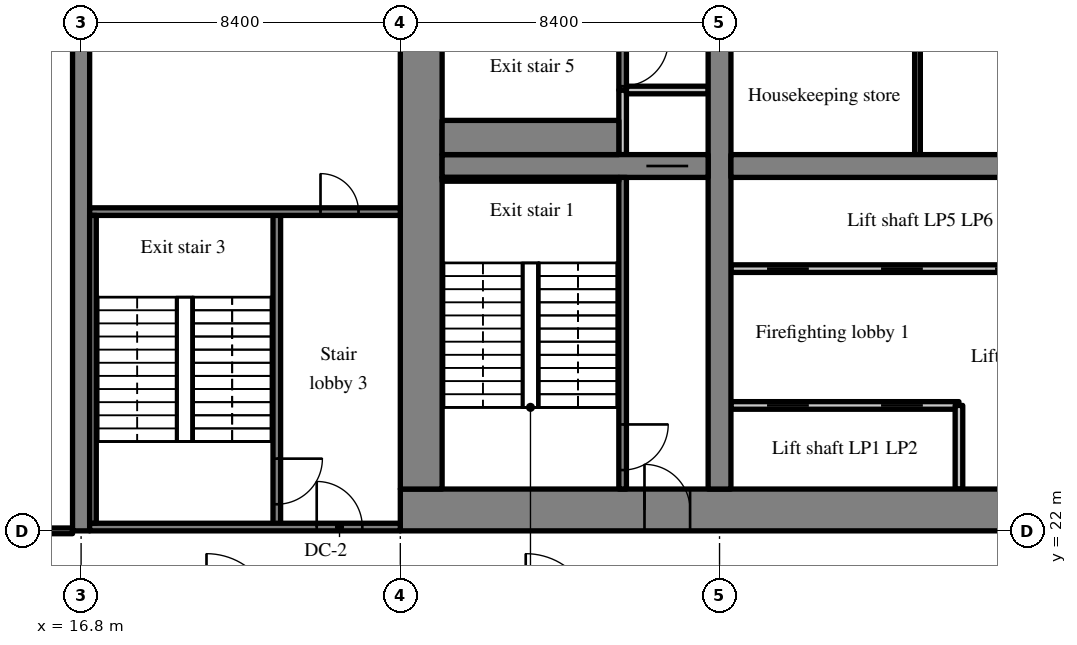
"""IFC4 building model, lengths in metres.
Left out: names, types, materials, properties, quantities, classifications, styles, units other than length and angle.
Written with IfcOpenShell. Run it as: python <this file> out.ifc"""

import sys

from ifc_helpers import new_model, si_unit, direction, frame, frame_2d, origin, place, context, subcontext, project, spatial, rectangle, extrude, source, transform, mapped, element, fill, save


model = new_model("IFC4")
c1 = context("Model", 3, precision=1e-05, world=origin(), true_north=direction((0.0, 1.0)))
c2 = subcontext(c1, "Body", "Model", "MODEL_VIEW")
j1 = project(units=[si_unit("LENGTHUNIT", "METRE"), si_unit("PLANEANGLEUNIT", "RADIAN")], contexts=[c1])
p1 = place(None, origin())
s1 = spatial("IfcSite", under=j1, at=p1, CompositionType="ELEMENT")
p2 = place(p1, origin())
s2 = spatial("IfcBuilding", under=s1, at=p2, CompositionType="ELEMENT")
p3 = place(p2, frame((0.0, 0.0, 18.0)))
s3 = spatial("IfcBuildingStorey", under=s2, at=p3, CompositionType="ELEMENT", Elevation=18.0)
m1 = source(origin(), c2, "Body", "SweptSolid", [
    extrude(rectangle(XDim=50.4, YDim=1.1, at=frame_2d((25.2, 0.0))), origin(), (0.0, 0.0, 1.0), 4.72),
])
p4 = place(p3, frame((25.2, 22.55, 0.0), z_axis=(0.0, 0.0, 1.0), x_axis=(1.0, 0.0, 0.0)))
e1 = element("IfcWall", 1, at=p4, inside=s3, PredefinedType="SHEAR", context=c2, shape_type="MappedRepresentation", body=[
    mapped(m1, transform((0.0, 0.0, 0.0), scale=1.0)),
])
m2 = source(origin(), c2, "Body", "SweptSolid", [
    extrude(rectangle(XDim=1.8, YDim=2.1, at=frame_2d((0.9, 1.05))), frame((0.0, 0.56, 0.0), z_axis=(0.0, -1.0, 0.0), x_axis=(1.0, 0.0, 0.0)), (0.0, 0.0, 1.0), 1.12),
])
p5 = place(p4, frame((15.9, 0.0, 0.0)))
e2 = element("IfcOpeningElement", 2, at=p5, cuts=e1, PredefinedType="OPENING", context=c2, shape_type="MappedRepresentation", body=[
    mapped(m2, transform((0.0, 0.0, 0.0), scale=1.0)),
])
m3 = source(origin(), c2, "Body", "SweptSolid", [
    extrude(rectangle(XDim=1.2, YDim=2.1, at=frame_2d((0.6, 1.05))), frame((0.0, 0.56, 0.0), z_axis=(0.0, -1.0, 0.0), x_axis=(1.0, 0.0, 0.0)), (0.0, 0.0, 1.0), 1.12),
])
p6 = place(p4, frame((27.0, 0.0, 0.0)))
e3 = element("IfcOpeningElement", 3, at=p6, cuts=e1, PredefinedType="OPENING", context=c2, shape_type="MappedRepresentation", body=[
    mapped(m3, transform((0.0, 0.0, 0.0), scale=1.0)),
])
m4 = source(origin(), c2, "Body", "SweptSolid", [
    extrude(rectangle(XDim=0.9, YDim=2.1, at=frame_2d((0.45, 1.05))), frame((0.0, 0.56, 0.0), z_axis=(0.0, -1.0, 0.0), x_axis=(1.0, 0.0, 0.0)), (0.0, 0.0, 1.0), 1.12),
])
p7 = place(p4, frame((34.5, 0.0, 0.0)))
e4 = element("IfcOpeningElement", 4, at=p7, cuts=e1, PredefinedType="OPENING", context=c2, shape_type="MappedRepresentation", body=[
    mapped(m4, transform((0.0, 0.0, 0.0), scale=1.0)),
])
p8 = place(p4, frame((31.5, 0.0, 0.0)))
e5 = element("IfcOpeningElement", 5, at=p8, cuts=e1, PredefinedType="OPENING", context=c2, shape_type="MappedRepresentation", body=[
    mapped(m4, transform((0.0, 0.0, 0.0), scale=1.0)),
])
p9 = place(p4, frame((39.75, 0.0, 0.0)))
e6 = element("IfcOpeningElement", 6, at=p9, cuts=e1, PredefinedType="OPENING", context=c2, shape_type="MappedRepresentation", body=[
    mapped(m4, transform((0.0, 0.0, 0.0), scale=1.0)),
])
p10 = place(p4, frame((36.75, 0.0, 0.0)))
e7 = element("IfcOpeningElement", 7, at=p10, cuts=e1, PredefinedType="OPENING", context=c2, shape_type="MappedRepresentation", body=[
    mapped(m4, transform((0.0, 0.0, 0.0), scale=1.0)),
])
p11 = place(p4, frame((6.425, 0.0, 0.0)))
e8 = element("IfcOpeningElement", 8, at=p11, cuts=e1, PredefinedType="OPENING", context=c2, shape_type="MappedRepresentation", body=[
    mapped(m3, transform((0.0, 0.0, 0.0), scale=1.0)),
])
p12 = place(p4, frame((47.675, 0.0, 0.0)))
e9 = element("IfcOpeningElement", 9, at=p12, cuts=e1, PredefinedType="OPENING", context=c2, shape_type="MappedRepresentation", body=[
    mapped(m3, transform((0.0, 0.0, 0.0), scale=1.0)),
])
m5 = source(origin(), c2, "Body", "SweptSolid", [
    extrude(rectangle(XDim=17.8, YDim=1.1, at=frame_2d((8.9, 0.0))), origin(), (0.0, 0.0, 1.0), 4.72),
])
p13 = place(p3, frame((25.75, 23.1, 0.0), z_axis=(0.0, 0.0, 1.0), x_axis=(0.0, 1.0, 0.0)))
e10 = element("IfcWall", 10, at=p13, inside=s3, PredefinedType="SHEAR", context=c2, shape_type="MappedRepresentation", body=[
    mapped(m5, transform((0.0, 0.0, 0.0), scale=1.0)),
])
m6 = source(origin(), c2, "Body", "SweptSolid", [
    extrude(rectangle(XDim=17.8, YDim=0.6, at=frame_2d((8.9, 0.0))), origin(), (0.0, 0.0, 1.0), 4.72),
])
p14 = place(p3, frame((33.6, 23.1, 0.0), z_axis=(0.0, 0.0, 1.0), x_axis=(0.0, 1.0, 0.0)))
e11 = element("IfcWall", 11, at=p14, inside=s3, PredefinedType="SHEAR", context=c2, shape_type="MappedRepresentation", body=[
    mapped(m6, transform((0.0, 0.0, 0.0), scale=1.0)),
])
m7 = source(origin(), c2, "Body", "SweptSolid", [
    extrude(rectangle(XDim=1.1, YDim=2.1, at=frame_2d((0.55, 1.05))), frame((0.0, 0.31, 0.0), z_axis=(0.0, -1.0, 0.0), x_axis=(1.0, 0.0, 0.0)), (0.0, 0.0, 1.0), 0.62),
])
p15 = place(p14, frame((12.35, 0.0, 0.0)))
e12 = element("IfcOpeningElement", 12, at=p15, cuts=e11, PredefinedType="OPENING", context=c2, shape_type="MappedRepresentation", body=[
    mapped(m7, transform((0.0, 0.0, 0.0), scale=1.0)),
])
m8 = source(origin(), c2, "Body", "SweptSolid", [
    extrude(rectangle(XDim=7.0, YDim=0.6, at=frame_2d((3.5, 0.0))), origin(), (0.0, 0.0, 1.0), 4.72),
])
p16 = place(p3, frame((26.3, 31.6, 0.0), z_axis=(0.0, 0.0, 1.0), x_axis=(1.0, 0.0, 0.0)))
e13 = element("IfcWall", 13, at=p16, inside=s3, PredefinedType="SHEAR", context=c2, shape_type="MappedRepresentation", body=[
    mapped(m8, transform((0.0, 0.0, 0.0), scale=1.0)),
])
p17 = place(p16, frame((5.375, 0.0, 0.0)))
e14 = element("IfcOpeningElement", 14, at=p17, cuts=e13, PredefinedType="OPENING", context=c2, shape_type="MappedRepresentation", body=[
    mapped(m7, transform((0.0, 0.0, 0.0), scale=1.0)),
])
m9 = source(origin(), c2, "Body", "SweptSolid", [
    extrude(rectangle(XDim=16.2, YDim=0.6, at=frame_2d((8.1, 0.0))), origin(), (0.0, 0.0, 1.0), 4.72),
])
p18 = place(p3, frame((33.9, 31.6, 0.0), z_axis=(0.0, 0.0, 1.0), x_axis=(1.0, 0.0, 0.0)))
e15 = element("IfcWall", 15, at=p18, inside=s3, PredefinedType="SHEAR", context=c2, shape_type="MappedRepresentation", body=[
    mapped(m9, transform((0.0, 0.0, 0.0), scale=1.0)),
])
m10 = source(origin(), c2, "Body", "SweptSolid", [
    extrude(rectangle(XDim=1.0, YDim=2.1, at=frame_2d((0.5, 1.05))), frame((0.0, 0.31, 0.0), z_axis=(0.0, -1.0, 0.0), x_axis=(1.0, 0.0, 0.0)), (0.0, 0.0, 1.0), 0.62),
])
p19 = place(p18, frame((14.65, 0.0, 0.0)))
e16 = element("IfcOpeningElement", 16, at=p19, cuts=e15, PredefinedType="OPENING", context=c2, shape_type="MappedRepresentation", body=[
    mapped(m10, transform((0.0, 0.0, 0.0), scale=1.0)),
])
m11 = source(origin(), c2, "Body", "SweptSolid", [
    extrude(rectangle(XDim=20.0, YDim=0.45, at=frame_2d((10.0, 0.0))), origin(), (0.0, 0.0, 1.0), 4.72),
])
p20 = place(p3, frame((16.8, 22.0, 0.0), z_axis=(0.0, 0.0, 1.0), x_axis=(0.0, 1.0, 0.0)))
e17 = element("IfcWall", 17, at=p20, inside=s3, PredefinedType="SHEAR", context=c2, shape_type="MappedRepresentation", body=[
    mapped(m11, transform((0.0, 0.0, 0.0), scale=1.0)),
])
m12 = source(origin(), c2, "Body", "SweptSolid", [
    extrude(rectangle(XDim=6.0, YDim=0.2, at=frame_2d((3.0, 0.0))), origin(), (0.0, 0.0, 1.0), 4.72),
])
p21 = place(p3, frame((33.9, 25.3, 0.0), z_axis=(0.0, 0.0, 1.0), x_axis=(1.0, 0.0, 0.0)))
e18 = element("IfcWall", 18, at=p21, inside=s3, PredefinedType="SOLIDWALL", context=c2, shape_type="MappedRepresentation", body=[
    mapped(m12, transform((0.0, 0.0, 0.0), scale=1.0)),
])
m13 = source(origin(), c2, "Body", "SweptSolid", [
    extrude(rectangle(XDim=1.1, YDim=2.1, at=frame_2d((0.55, 1.05))), frame((0.0, 0.11, 0.0), z_axis=(0.0, -1.0, 0.0), x_axis=(1.0, 0.0, 0.0)), (0.0, 0.0, 1.0), 0.22),
])
p22 = place(p21, frame((0.95, 0.0, 0.0)))
e19 = element("IfcOpeningElement", 19, at=p22, cuts=e18, PredefinedType="OPENING", context=c2, shape_type="MappedRepresentation", body=[
    mapped(m13, transform((0.0, 0.0, 0.0), scale=1.0)),
])
p23 = place(p21, frame((3.95, 0.0, 0.0)))
e20 = element("IfcOpeningElement", 20, at=p23, cuts=e18, PredefinedType="OPENING", context=c2, shape_type="MappedRepresentation", body=[
    mapped(m13, transform((0.0, 0.0, 0.0), scale=1.0)),
])
m14 = source(origin(), c2, "Body", "SweptSolid", [
    extrude(rectangle(XDim=12.0, YDim=0.2, at=frame_2d((6.0, 0.0))), origin(), (0.0, 0.0, 1.0), 4.72),
])
p24 = place(p3, frame((33.9, 28.9, 0.0), z_axis=(0.0, 0.0, 1.0), x_axis=(1.0, 0.0, 0.0)))
e21 = element("IfcWall", 21, at=p24, inside=s3, PredefinedType="SOLIDWALL", context=c2, shape_type="MappedRepresentation", body=[
    mapped(m14, transform((0.0, 0.0, 0.0), scale=1.0)),
])
p25 = place(p24, frame((0.95, 0.0, 0.0)))
e22 = element("IfcOpeningElement", 22, at=p25, cuts=e21, PredefinedType="OPENING", context=c2, shape_type="MappedRepresentation", body=[
    mapped(m13, transform((0.0, 0.0, 0.0), scale=1.0)),
])
p26 = place(p24, frame((3.95, 0.0, 0.0)))
e23 = element("IfcOpeningElement", 23, at=p26, cuts=e21, PredefinedType="OPENING", context=c2, shape_type="MappedRepresentation", body=[
    mapped(m13, transform((0.0, 0.0, 0.0), scale=1.0)),
])
p27 = place(p24, frame((6.95, 0.0, 0.0)))
e24 = element("IfcOpeningElement", 24, at=p27, cuts=e21, PredefinedType="OPENING", context=c2, shape_type="MappedRepresentation", body=[
    mapped(m13, transform((0.0, 0.0, 0.0), scale=1.0)),
])
p28 = place(p24, frame((9.95, 0.0, 0.0)))
e25 = element("IfcOpeningElement", 25, at=p28, cuts=e21, PredefinedType="OPENING", context=c2, shape_type="MappedRepresentation", body=[
    mapped(m13, transform((0.0, 0.0, 0.0), scale=1.0)),
])
m15 = source(origin(), c2, "Body", "SweptSolid", [
    extrude(rectangle(XDim=2.2, YDim=0.2, at=frame_2d((1.1, 0.0))), origin(), (0.0, 0.0, 1.0), 4.72),
])
p29 = place(p3, frame((39.9, 23.1, 0.0), z_axis=(0.0, 0.0, 1.0), x_axis=(0.0, 1.0, 0.0)))
e26 = element("IfcWall", 26, at=p29, inside=s3, PredefinedType="SOLIDWALL", context=c2, shape_type="MappedRepresentation", body=[
    mapped(m15, transform((0.0, 0.0, 0.0), scale=1.0)),
])
m16 = source(origin(), c2, "Body", "SweptSolid", [
    extrude(rectangle(XDim=3.1, YDim=0.15, at=frame_2d((1.55, 0.0))), origin(), (0.0, 0.0, 1.0), 4.72),
])
p30 = place(p3, frame((38.809, 31.9, 0.0), z_axis=(0.0, 0.0, 1.0), x_axis=(0.0, 1.0, 0.0)))
e27 = element("IfcWall", 27, at=p30, inside=s3, PredefinedType="PARTITIONING", context=c2, shape_type="MappedRepresentation", body=[
    mapped(m16, transform((0.0, 0.0, 0.0), scale=1.0)),
])
m17 = source(origin(), c2, "Body", "SweptSolid", [
    extrude(rectangle(XDim=8.2, YDim=0.2, at=frame_2d((4.1, 0.0))), origin(), (0.0, 0.0, 1.0), 4.72),
])
p31 = place(p3, frame((31.05, 23.1, 0.0), z_axis=(0.0, 0.0, 1.0), x_axis=(0.0, 1.0, 0.0)))
e28 = element("IfcWall", 28, at=p31, inside=s3, PredefinedType="SOLIDWALL", context=c2, shape_type="MappedRepresentation", body=[
    mapped(m17, transform((0.0, 0.0, 0.0), scale=1.0)),
])
m18 = source(origin(), c2, "Body", "SweptSolid", [
    extrude(rectangle(XDim=1.2, YDim=2.1, at=frame_2d((0.6, 1.05))), frame((0.0, 0.11, 0.0), z_axis=(0.0, -1.0, 0.0), x_axis=(1.0, 0.0, 0.0)), (0.0, 0.0, 1.0), 0.22),
])
p32 = place(p31, frame((0.5, 0.0, 0.0)))
e29 = element("IfcOpeningElement", 29, at=p32, cuts=e28, PredefinedType="OPENING", context=c2, shape_type="MappedRepresentation", body=[
    mapped(m18, transform((0.0, 0.0, 0.0), scale=1.0)),
])
m19 = source(origin(), c2, "Body", "SweptSolid", [
    extrude(rectangle(XDim=1.7, YDim=0.2, at=frame_2d((0.85, 0.0))), origin(), (0.0, 0.0, 1.0), 4.72),
])
p33 = place(p3, frame((31.05, 31.9, 0.0), z_axis=(0.0, 0.0, 1.0), x_axis=(0.0, 1.0, 0.0)))
e30 = element("IfcWall", 30, at=p33, inside=s3, PredefinedType="SOLIDWALL", context=c2, shape_type="MappedRepresentation", body=[
    mapped(m19, transform((0.0, 0.0, 0.0), scale=1.0)),
])
m20 = source(origin(), c2, "Body", "SweptSolid", [
    extrude(rectangle(XDim=2.15, YDim=0.2, at=frame_2d((1.075, 0.0))), origin(), (0.0, 0.0, 1.0), 4.72),
])
p34 = place(p3, frame((31.15, 33.6, 0.0), z_axis=(0.0, 0.0, 1.0), x_axis=(1.0, 0.0, 0.0)))
e31 = element("IfcWall", 31, at=p34, inside=s3, PredefinedType="SOLIDWALL", context=c2, shape_type="MappedRepresentation", body=[
    mapped(m20, transform((0.0, 0.0, 0.0), scale=1.0)),
])
m21 = source(origin(), c2, "Body", "SweptSolid", [
    extrude(rectangle(XDim=7.3, YDim=0.2, at=frame_2d((3.65, 0.0))), origin(), (0.0, 0.0, 1.0), 4.72),
])
p35 = place(p3, frame((31.05, 33.6, 0.0), z_axis=(0.0, 0.0, 1.0), x_axis=(0.0, 1.0, 0.0)))
e32 = element("IfcWall", 32, at=p35, inside=s3, PredefinedType="SOLIDWALL", context=c2, shape_type="MappedRepresentation", body=[
    mapped(m21, transform((0.0, 0.0, 0.0), scale=1.0)),
])
p36 = place(p35, frame((0.1, 0.0, 0.0)))
e33 = element("IfcOpeningElement", 33, at=p36, cuts=e32, PredefinedType="OPENING", context=c2, shape_type="MappedRepresentation", body=[
    mapped(m18, transform((0.0, 0.0, 0.0), scale=1.0)),
])
m22 = source(origin(), c2, "Body", "SweptSolid", [
    extrude(rectangle(XDim=8.3, YDim=0.2, at=frame_2d((4.15, 0.0))), origin(), (0.0, 0.0, 1.0), 4.72),
])
p37 = place(p3, frame((21.95, 22.1, 0.0), z_axis=(0.0, 0.0, 1.0), x_axis=(0.0, 1.0, 0.0)))
e34 = element("IfcWall", 34, at=p37, inside=s3, PredefinedType="SOLIDWALL", context=c2, shape_type="MappedRepresentation", body=[
    mapped(m22, transform((0.0, 0.0, 0.0), scale=1.0)),
])
p38 = place(p37, frame((0.6, 0.0, 0.0)))
e35 = element("IfcOpeningElement", 35, at=p38, cuts=e34, PredefinedType="OPENING", context=c2, shape_type="MappedRepresentation", body=[
    mapped(m18, transform((0.0, 0.0, 0.0), scale=1.0)),
])
m23 = source(origin(), c2, "Body", "SweptSolid", [
    extrude(rectangle(XDim=8.175, YDim=0.2, at=frame_2d((4.087, 0.0))), origin(), (0.0, 0.0, 1.0), 4.72),
])
p39 = place(p3, frame((17.025, 22.1, 0.0), z_axis=(0.0, 0.0, 1.0), x_axis=(1.0, 0.0, 0.0)))
e36 = element("IfcWall", 36, at=p39, inside=s3, PredefinedType="SOLIDWALL", context=c2, shape_type="MappedRepresentation", body=[
    mapped(m23, transform((0.0, 0.0, 0.0), scale=1.0)),
])
p40 = place(p39, frame((5.975, 0.0, 0.0)))
e37 = element("IfcOpeningElement", 37, at=p40, cuts=e36, PredefinedType="OPENING", context=c2, shape_type="MappedRepresentation", body=[
    mapped(m18, transform((0.0, 0.0, 0.0), scale=1.0)),
])
p41 = place(p3, frame((17.025, 30.4, 0.0), z_axis=(0.0, 0.0, 1.0), x_axis=(1.0, 0.0, 0.0)))
e38 = element("IfcWall", 38, at=p41, inside=s3, PredefinedType="SOLIDWALL", context=c2, shape_type="MappedRepresentation", body=[
    mapped(m23, transform((0.0, 0.0, 0.0), scale=1.0)),
])
m24 = source(origin(), c2, "Body", "SweptSolid", [
    extrude(rectangle(XDim=1.0, YDim=2.1, at=frame_2d((0.5, 1.05))), frame((0.0, 0.11, 0.0), z_axis=(0.0, -1.0, 0.0), x_axis=(1.0, 0.0, 0.0)), (0.0, 0.0, 1.0), 0.22),
])
p42 = place(p41, frame((6.075, 0.0, 0.0)))
e39 = element("IfcOpeningElement", 39, at=p42, cuts=e38, PredefinedType="OPENING", context=c2, shape_type="MappedRepresentation", body=[
    mapped(m24, transform((0.0, 0.0, 0.0), scale=1.0)),
])
m25 = source(origin(), c2, "Body", "SweptSolid", [
    extrude(rectangle(XDim=4.65, YDim=0.1, at=frame_2d((2.325, 0.0))), origin(), (0.0, 0.0, 1.0), 4.72),
])
p43 = place(p3, frame((26.3, 31.25, 0.0), z_axis=(0.0, 0.0, 1.0), x_axis=(1.0, 0.0, 0.0)))
e40 = element("IfcWall", 40, at=p43, inside=s3, PredefinedType="SOLIDWALL", context=c2, shape_type="MappedRepresentation", body=[
    mapped(m25, transform((0.0, 0.0, 0.0), scale=1.0)),
])
m26 = source(origin(), c2, "Body", "SweptSolid", [
    extrude(rectangle(XDim=8.1, YDim=0.175, at=frame_2d((4.05, 0.0))), origin(), (0.0, 0.0, 1.0), 4.72),
])
p44 = place(p3, frame((17.112, 22.2, 0.0), z_axis=(0.0, 0.0, 1.0), x_axis=(0.0, 1.0, 0.0)))
e41 = element("IfcWall", 41, at=p44, inside=s3, PredefinedType="SOLIDWALL", context=c2, shape_type="MappedRepresentation", body=[
    mapped(m26, transform((0.0, 0.0, 0.0), scale=1.0)),
])
m27 = source(origin(), c2, "Body", "SweptSolid", [
    extrude(rectangle(XDim=4.65, YDim=0.9, at=frame_2d((2.325, 0.0))), origin(), (0.0, 0.0, 1.0), 4.72),
])
p45 = place(p3, frame((26.3, 32.35, 0.0), z_axis=(0.0, 0.0, 1.0), x_axis=(1.0, 0.0, 0.0)))
e42 = element("IfcWall", 42, at=p45, inside=s3, PredefinedType="SOLIDWALL", context=c2, shape_type="MappedRepresentation", body=[
    mapped(m27, transform((0.0, 0.0, 0.0), scale=1.0)),
])
m28 = source(origin(), c2, "Body", "SweptSolid", [
    extrude(rectangle(XDim=7.95, YDim=0.15, at=frame_2d((3.975, 0.0))), origin(), (0.0, 0.0, 1.0), 4.02),
])
p46 = place(p3, frame((8.625, 22.0, 0.0), z_axis=(0.0, 0.0, 1.0), x_axis=(1.0, 0.0, 0.0)))
e43 = element("IfcWall", 43, at=p46, inside=s3, PredefinedType="PARTITIONING", context=c2, shape_type="MappedRepresentation", body=[
    mapped(m28, transform((0.0, 0.0, 0.0), scale=1.0)),
])
m29 = source(origin(), c2, "Body", "SweptSolid", [
    extrude(rectangle(XDim=1.8, YDim=2.1, at=frame_2d((0.9, 1.05))), frame((0.0, 0.085, 0.0), z_axis=(0.0, -1.0, 0.0), x_axis=(1.0, 0.0, 0.0)), (0.0, 0.0, 1.0), 0.17),
])
p47 = place(p46, frame((3.075, 0.0, 0.0)))
e44 = element("IfcOpeningElement", 44, at=p47, cuts=e43, PredefinedType="OPENING", context=c2, shape_type="MappedRepresentation", body=[
    mapped(m29, transform((0.0, 0.0, 0.0), scale=1.0)),
])
m30 = source(origin(), c2, "Body", "SweptSolid", [
    extrude(rectangle(XDim=1.1, YDim=2.1, at=frame_2d((0.55, 1.05))), frame((0.0, 0.025, 0.0), z_axis=(0.0, -1.0, 0.0), x_axis=(1.0, 0.0, 0.0)), (0.0, 0.0, 1.0), 0.05),
])
p48 = place(p22, origin())
e45 = element("IfcDoor", 45, at=p48, inside=s3, OperationType="SLIDING_TO_LEFT", PredefinedType="DOOR", context=c2, shape_type="MappedRepresentation", body=[
    mapped(m30, transform((0.0, 0.0, 0.0), scale=1.0)),
])
fill(e19, e45)
p49 = place(p23, origin())
e46 = element("IfcDoor", 46, at=p49, inside=s3, OperationType="SLIDING_TO_RIGHT", PredefinedType="DOOR", context=c2, shape_type="MappedRepresentation", body=[
    mapped(m30, transform((0.0, 0.0, 0.0), scale=1.0)),
])
fill(e20, e46)
p50 = place(p25, origin())
e47 = element("IfcDoor", 47, at=p50, inside=s3, OperationType="SLIDING_TO_LEFT", PredefinedType="DOOR", context=c2, shape_type="MappedRepresentation", body=[
    mapped(m30, transform((0.0, 0.0, 0.0), scale=1.0)),
])
fill(e22, e47)
p51 = place(p26, origin())
e48 = element("IfcDoor", 48, at=p51, inside=s3, OperationType="SLIDING_TO_RIGHT", PredefinedType="DOOR", context=c2, shape_type="MappedRepresentation", body=[
    mapped(m30, transform((0.0, 0.0, 0.0), scale=1.0)),
])
fill(e23, e48)
p52 = place(p27, origin())
e49 = element("IfcDoor", 49, at=p52, inside=s3, OperationType="SLIDING_TO_LEFT", PredefinedType="DOOR", context=c2, shape_type="MappedRepresentation", body=[
    mapped(m30, transform((0.0, 0.0, 0.0), scale=1.0)),
])
fill(e24, e49)
m31 = source(origin(), c2, "Body", "SweptSolid", [
    extrude(rectangle(XDim=1.2, YDim=2.1, at=frame_2d((0.6, 1.05))), frame((0.0, 0.025, 0.0), z_axis=(0.0, -1.0, 0.0), x_axis=(1.0, 0.0, 0.0)), (0.0, 0.0, 1.0), 0.05),
])
p53 = place(p32, origin())
e50 = element("IfcDoor", 50, at=p53, inside=s3, OperationType="SINGLE_SWING_RIGHT", PredefinedType="DOOR", context=c2, shape_type="MappedRepresentation", body=[
    mapped(m31, transform((0.0, 0.0, 0.0), scale=1.0)),
])
fill(e29, e50)
m32 = source(origin(), c2, "Body", "SweptSolid", [
    extrude(rectangle(XDim=1.2, YDim=2.1, at=frame_2d((0.6, 1.05))), frame((0.0, 0.325, 0.0), z_axis=(0.0, -1.0, 0.0), x_axis=(1.0, 0.0, 0.0)), (0.0, 0.0, 1.0), 0.05),
])
p54 = place(p11, origin())
e51 = element("IfcDoor", 51, at=p54, inside=s3, OperationType="SINGLE_SWING_LEFT", PredefinedType="DOOR", context=c2, shape_type="MappedRepresentation", body=[
    mapped(m32, transform((0.0, 0.0, 0.0), scale=1.0)),
])
fill(e8, e51)
p55 = place(p17, origin())
e52 = element("IfcDoor", 52, at=p55, inside=s3, OperationType="SLIDING_TO_RIGHT", PredefinedType="DOOR", context=c2, shape_type="MappedRepresentation", body=[
    mapped(m30, transform((0.0, 0.0, 0.0), scale=1.0)),
])
fill(e14, e52)
p56 = place(p36, origin())
e53 = element("IfcDoor", 53, at=p56, inside=s3, OperationType="SINGLE_SWING_RIGHT", PredefinedType="DOOR", context=c2, shape_type="MappedRepresentation", body=[
    mapped(m31, transform((0.0, 0.0, 0.0), scale=1.0)),
])
fill(e33, e53)
p57 = place(p38, origin())
e54 = element("IfcDoor", 54, at=p57, inside=s3, OperationType="SINGLE_SWING_RIGHT", PredefinedType="DOOR", context=c2, shape_type="MappedRepresentation", body=[
    mapped(m31, transform((0.0, 0.0, 0.0), scale=1.0)),
])
fill(e35, e54)
p58 = place(p40, origin())
e55 = element("IfcDoor", 55, at=p58, inside=s3, OperationType="SINGLE_SWING_LEFT", PredefinedType="DOOR", context=c2, shape_type="MappedRepresentation", body=[
    mapped(m31, transform((0.0, 0.0, 0.0), scale=1.0)),
])
fill(e37, e55)
m33 = source(origin(), c2, "Body", "SweptSolid", [
    extrude(rectangle(XDim=1.0, YDim=2.1, at=frame_2d((0.5, 1.05))), frame((0.0, 0.025, 0.0), z_axis=(0.0, -1.0, 0.0), x_axis=(1.0, 0.0, 0.0)), (0.0, 0.0, 1.0), 0.05),
])
p59 = place(p42, origin())
e56 = element("IfcDoor", 56, at=p59, inside=s3, OperationType="SINGLE_SWING_LEFT", PredefinedType="DOOR", context=c2, shape_type="MappedRepresentation", body=[
    mapped(m33, transform((0.0, 0.0, 0.0), scale=1.0)),
])
fill(e39, e56)
save(model, sys.argv[1])
